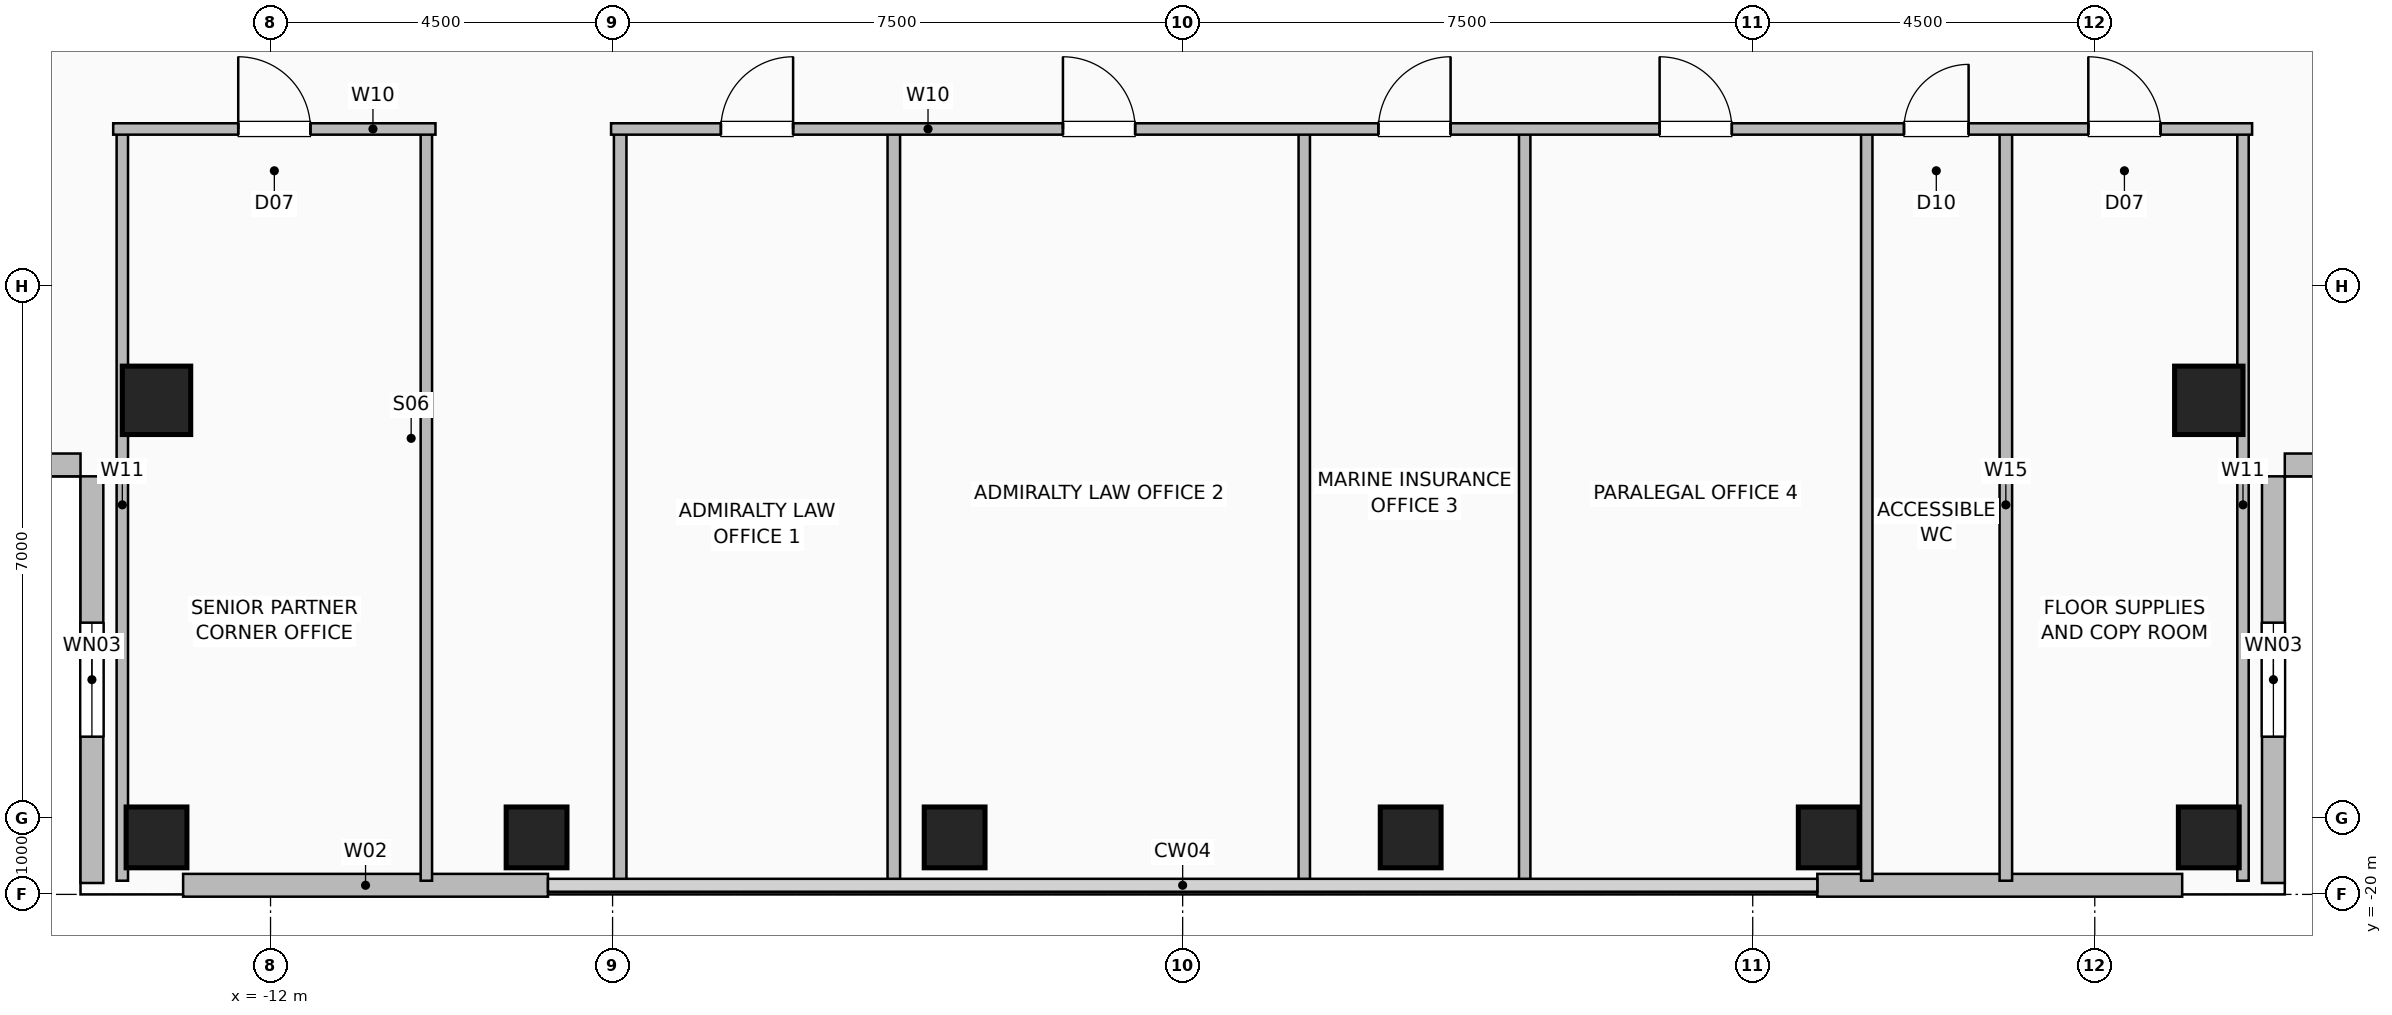
"""IFC4 building model, lengths in metres.
Left out: names, types, materials, properties, quantities, classifications, styles, units other than length and angle.
Written with IfcOpenShell. Run it as: python <this file> out.ifc"""

import sys

from ifc_helpers import new_model, si_unit, direction, frame, frame_2d, origin, origin_2d, place, context, subcontext, project, spatial, rectangle, hollow_rectangle, extrude, element, fill, save


model = new_model("IFC4")
c1 = context("Model", 3, precision=1e-05, world=origin(), true_north=direction((0.0, 1.0)))
c2 = subcontext(c1, "Body", "Model", "MODEL_VIEW")
j1 = project(units=[si_unit("LENGTHUNIT", "METRE"), si_unit("PLANEANGLEUNIT", "RADIAN")], contexts=[c1])
p1 = place(None, origin())
s1 = spatial("IfcSite", under=j1, at=p1, CompositionType="ELEMENT")
p2 = place(p1, origin())
s2 = spatial("IfcBuilding", under=s1, at=p2, CompositionType="ELEMENT")
p3 = place(p2, frame((0.0, 0.0, 169.8)))
s3 = spatial("IfcBuildingStorey", under=s2, at=p3, CompositionType="ELEMENT", Elevation=169.8)
for number, where, z_axis, x_axis in (
    (1, (-13.5, -19.25, 0.0), (0.0, 0.0, 1.0), (1.0, 0.0, 0.0)),
    (2, (-8.5, -19.25, 0.0), (0.0, 0.0, 1.0), (1.0, 0.0, 0.0)),
    (3, (-3.0, -19.25, 0.0), (0.0, 0.0, 1.0), (1.0, 0.0, 0.0)),
    (4, (3.0, -19.25, 0.0), (0.0, 0.0, 1.0), (1.0, 0.0, 0.0)),
    (5, (8.5, -19.25, 0.0), (0.0, 0.0, 1.0), (1.0, 0.0, 0.0)),
    (6, (13.5, -19.25, 0.0), (0.0, 0.0, 1.0), (1.0, 0.0, 0.0)),
):
    element("IfcColumn", number, at=place(p3, frame(where, z_axis=z_axis, x_axis=x_axis)), inside=s3, PredefinedType="COLUMN", context=c2, shape_type="SweptSolid", body=[
        extrude(hollow_rectangle(XDim=0.8, YDim=0.8, WallThickness=0.04, at=origin_2d()), origin(), (0.0, 0.0, 1.0), 3.6),
    ])
for number, where, z_axis, x_axis in (
    (7, (-13.5, -13.5, 0.0), (0.0, 0.0, 1.0), (1.0, 0.0, 0.0)),
    (8, (13.5, -13.5, 0.0), (0.0, 0.0, 1.0), (1.0, 0.0, 0.0)),
):
    element("IfcColumn", number, at=place(p3, frame(where, z_axis=z_axis, x_axis=x_axis)), inside=s3, PredefinedType="COLUMN", context=c2, shape_type="SweptSolid", body=[
        extrude(hollow_rectangle(XDim=0.9, YDim=0.9, WallThickness=0.045, at=origin_2d()), origin(), (0.0, 0.0, 1.0), 3.6),
    ])
for number, where, z_axis, x_axis in (
    (9, (-13.15, -19.88, 0.0), (0.0, 0.0, 1.0), (1.0, 0.0, 0.0)),
    (10, (8.35, -19.88, 0.0), (0.0, 0.0, 1.0), (1.0, 0.0, 0.0)),
):
    element("IfcWall", number, at=place(p3, frame(where, z_axis=z_axis, x_axis=x_axis)), inside=s3, PredefinedType="SOLIDWALL", context=c2, shape_type="SweptSolid", body=[
        extrude(rectangle(XDim=4.8, YDim=0.3, at=frame_2d((2.4, 0.0))), origin(), (0.0, 0.0, 1.0), 3.36),
    ])
p4 = place(p3, frame((-14.35, -19.85, 0.0), z_axis=(0.0, 0.0, 1.0), x_axis=(0.0, 1.0, 0.0)))
e11 = element("IfcWall", 11, at=p4, inside=s3, PredefinedType="SOLIDWALL", context=c2, shape_type="SweptSolid", body=[
    extrude(rectangle(XDim=5.35, YDim=0.3, at=frame_2d((2.675, 0.0))), origin(), (0.0, 0.0, 1.0), 3.36),
])
p5 = place(p4, frame((1.925, 0.0, 0.9)))
e12 = element("IfcOpeningElement", 12, at=p5, cuts=e11, PredefinedType="OPENING", context=c2, shape_type="SweptSolid", body=[
    extrude(rectangle(XDim=1.5, YDim=1.8, at=frame_2d((0.75, 0.9))), frame((0.0, 0.16, 0.0), z_axis=(0.0, -1.0, 0.0), x_axis=(1.0, 0.0, 0.0)), (0.0, 0.0, 1.0), 0.32),
])
p6 = place(p3, frame((-19.85, -14.35, 0.0), z_axis=(0.0, 0.0, 1.0), x_axis=(1.0, 0.0, 0.0)))
e13 = element("IfcWall", 13, at=p6, inside=s3, PredefinedType="SOLIDWALL", context=c2, shape_type="SweptSolid", body=[
    extrude(rectangle(XDim=5.35, YDim=0.3, at=frame_2d((2.675, 0.0))), origin(), (0.0, 0.0, 1.0), 3.36),
])
p7 = place(p3, frame((14.35, -19.85, 0.0), z_axis=(0.0, 0.0, 1.0), x_axis=(0.0, 1.0, 0.0)))
e14 = element("IfcWall", 14, at=p7, inside=s3, PredefinedType="SOLIDWALL", context=c2, shape_type="SweptSolid", body=[
    extrude(rectangle(XDim=5.35, YDim=0.3, at=frame_2d((2.675, 0.0))), origin(), (0.0, 0.0, 1.0), 3.36),
])
p8 = place(p7, frame((1.925, 0.0, 0.9)))
e15 = element("IfcOpeningElement", 15, at=p8, cuts=e14, PredefinedType="OPENING", context=c2, shape_type="SweptSolid", body=[
    extrude(rectangle(XDim=1.5, YDim=1.8, at=frame_2d((0.75, 0.9))), frame((0.0, 0.16, 0.0), z_axis=(0.0, -1.0, 0.0), x_axis=(1.0, 0.0, 0.0)), (0.0, 0.0, 1.0), 0.32),
])
p9 = place(p3, frame((19.85, -14.35, 0.0), z_axis=(0.0, 0.0, 1.0), x_axis=(-1.0, 0.0, 0.0)))
e16 = element("IfcWall", 16, at=p9, inside=s3, PredefinedType="SOLIDWALL", context=c2, shape_type="SweptSolid", body=[
    extrude(rectangle(XDim=5.35, YDim=0.3, at=frame_2d((2.675, 0.0))), origin(), (0.0, 0.0, 1.0), 3.36),
])
for number, where, z_axis, x_axis in (
    (17, (-13.95, -19.82, 0.0), (0.0, 0.0, 1.0), (0.0, 1.0, 0.0)),
    (18, (-9.95, -19.82, 0.0), (0.0, 0.0, 1.0), (0.0, 1.0, 0.0)),
):
    element("IfcWall", number, at=place(p3, frame(where, z_axis=z_axis, x_axis=x_axis)), inside=s3, PredefinedType="PARTITIONING", context=c2, shape_type="SweptSolid", body=[
        extrude(rectangle(XDim=9.89, YDim=0.15, at=frame_2d((4.945, 0.0))), origin(), (0.0, 0.0, 1.0), 3.36),
    ])
p10 = place(p3, frame((-14.07, -9.93, 0.0), z_axis=(0.0, 0.0, 1.0), x_axis=(1.0, 0.0, 0.0)))
e19 = element("IfcWall", 19, at=p10, inside=s3, PredefinedType="PARTITIONING", context=c2, shape_type="SweptSolid", body=[
    extrude(rectangle(XDim=4.24, YDim=0.15, at=frame_2d((2.12, 0.0))), origin(), (0.0, 0.0, 1.0), 3.36),
])
p11 = place(p10, frame((1.645, 0.0, 0.0)))
e20 = element("IfcOpeningElement", 20, at=p11, cuts=e19, PredefinedType="OPENING", context=c2, shape_type="SweptSolid", body=[
    extrude(rectangle(XDim=0.95, YDim=2.06, at=frame_2d((0.475, 1.03))), frame((0.0, 0.085, 0.0), z_axis=(0.0, -1.0, 0.0), x_axis=(1.0, 0.0, 0.0)), (0.0, 0.0, 1.0), 0.17),
])
for number, where, z_axis, x_axis in (
    (21, (10.83, -19.82, 0.0), (0.0, 0.0, 1.0), (0.0, 1.0, 0.0)),
    (22, (-7.4, -19.82, 0.0), (0.0, 0.0, 1.0), (0.0, 1.0, 0.0)),
    (23, (-3.8, -19.82, 0.0), (0.0, 0.0, 1.0), (0.0, 1.0, 0.0)),
):
    element("IfcWall", number, at=place(p3, frame(where, z_axis=z_axis, x_axis=x_axis)), inside=s3, PredefinedType="PLUMBINGWALL", context=c2, shape_type="SweptSolid", body=[
        extrude(rectangle(XDim=9.89, YDim=0.165, at=frame_2d((4.945, 0.0))), origin(), (0.0, 0.0, 1.0), 3.36),
    ])
for number, where, z_axis, x_axis in (
    (24, (1.6, -19.82, 0.0), (0.0, 0.0, 1.0), (0.0, 1.0, 0.0)),
    (25, (4.5, -19.82, 0.0), (0.0, 0.0, 1.0), (0.0, 1.0, 0.0)),
    (26, (9.0, -19.82, 0.0), (0.0, 0.0, 1.0), (0.0, 1.0, 0.0)),
    (27, (13.95, -19.82, 0.0), (0.0, 0.0, 1.0), (0.0, 1.0, 0.0)),
):
    element("IfcWall", number, at=place(p3, frame(where, z_axis=z_axis, x_axis=x_axis)), inside=s3, PredefinedType="PARTITIONING", context=c2, shape_type="SweptSolid", body=[
        extrude(rectangle(XDim=9.89, YDim=0.15, at=frame_2d((4.945, 0.0))), origin(), (0.0, 0.0, 1.0), 3.36),
    ])
p12 = place(p3, frame((-7.52, -9.93, 0.0), z_axis=(0.0, 0.0, 1.0), x_axis=(1.0, 0.0, 0.0)))
e28 = element("IfcWall", 28, at=p12, inside=s3, PredefinedType="PARTITIONING", context=c2, shape_type="SweptSolid", body=[
    extrude(rectangle(XDim=21.59, YDim=0.15, at=frame_2d((10.795, 0.0))), origin(), (0.0, 0.0, 1.0), 3.36),
])
p13 = place(p12, frame((1.445, 0.0, 0.0)))
e29 = element("IfcOpeningElement", 29, at=p13, cuts=e28, PredefinedType="OPENING", context=c2, shape_type="SweptSolid", body=[
    extrude(rectangle(XDim=0.95, YDim=2.06, at=frame_2d((0.475, 1.03))), frame((0.0, 0.085, 0.0), z_axis=(0.0, -1.0, 0.0), x_axis=(1.0, 0.0, 0.0)), (0.0, 0.0, 1.0), 0.17),
])
p14 = place(p12, frame((5.945, 0.0, 0.0)))
e30 = element("IfcOpeningElement", 30, at=p14, cuts=e28, PredefinedType="OPENING", context=c2, shape_type="SweptSolid", body=[
    extrude(rectangle(XDim=0.95, YDim=2.06, at=frame_2d((0.475, 1.03))), frame((0.0, 0.085, 0.0), z_axis=(0.0, -1.0, 0.0), x_axis=(1.0, 0.0, 0.0)), (0.0, 0.0, 1.0), 0.17),
])
p15 = place(p12, frame((10.095, 0.0, 0.0)))
e31 = element("IfcOpeningElement", 31, at=p15, cuts=e28, PredefinedType="OPENING", context=c2, shape_type="SweptSolid", body=[
    extrude(rectangle(XDim=0.95, YDim=2.06, at=frame_2d((0.475, 1.03))), frame((0.0, 0.085, 0.0), z_axis=(0.0, -1.0, 0.0), x_axis=(1.0, 0.0, 0.0)), (0.0, 0.0, 1.0), 0.17),
])
p16 = place(p12, frame((13.795, 0.0, 0.0)))
e32 = element("IfcOpeningElement", 32, at=p16, cuts=e28, PredefinedType="OPENING", context=c2, shape_type="SweptSolid", body=[
    extrude(rectangle(XDim=0.95, YDim=2.06, at=frame_2d((0.475, 1.03))), frame((0.0, 0.085, 0.0), z_axis=(0.0, -1.0, 0.0), x_axis=(1.0, 0.0, 0.0)), (0.0, 0.0, 1.0), 0.17),
])
p17 = place(p12, frame((17.01, 0.0, 0.0)))
e33 = element("IfcOpeningElement", 33, at=p17, cuts=e28, PredefinedType="OPENING", context=c2, shape_type="SweptSolid", body=[
    extrude(rectangle(XDim=0.85, YDim=2.05, at=frame_2d((0.425, 1.025))), frame((0.0, 0.085, 0.0), z_axis=(0.0, -1.0, 0.0), x_axis=(1.0, 0.0, 0.0)), (0.0, 0.0, 1.0), 0.17),
])
p18 = place(p12, frame((19.435, 0.0, 0.0)))
e34 = element("IfcOpeningElement", 34, at=p18, cuts=e28, PredefinedType="OPENING", context=c2, shape_type="SweptSolid", body=[
    extrude(rectangle(XDim=0.95, YDim=2.06, at=frame_2d((0.475, 1.03))), frame((0.0, 0.085, 0.0), z_axis=(0.0, -1.0, 0.0), x_axis=(1.0, 0.0, 0.0)), (0.0, 0.0, 1.0), 0.17),
])
p19 = place(p5, origin())
e35 = element("IfcWindow", 35, at=p19, inside=s3, PartitioningType="SINGLE_PANEL", PredefinedType="WINDOW", context=c2, shape_type="SweptSolid", body=[
    extrude(rectangle(XDim=1.5, YDim=1.8, at=frame_2d((0.75, 0.9))), frame((0.0, 0.03, 0.0), z_axis=(0.0, -1.0, 0.0), x_axis=(1.0, 0.0, 0.0)), (0.0, 0.0, 1.0), 0.06),
])
fill(e12, e35)
p20 = place(p8, origin())
e36 = element("IfcWindow", 36, at=p20, inside=s3, PartitioningType="SINGLE_PANEL", PredefinedType="WINDOW", context=c2, shape_type="SweptSolid", body=[
    extrude(rectangle(XDim=1.5, YDim=1.8, at=frame_2d((0.75, 0.9))), frame((0.0, 0.03, 0.0), z_axis=(0.0, -1.0, 0.0), x_axis=(1.0, 0.0, 0.0)), (0.0, 0.0, 1.0), 0.06),
])
fill(e15, e36)
p21 = place(p11, origin())
e37 = element("IfcDoor", 37, at=p21, inside=s3, OperationType="SINGLE_SWING_LEFT", PredefinedType="DOOR", context=c2, shape_type="SweptSolid", body=[
    extrude(rectangle(XDim=0.95, YDim=2.06, at=frame_2d((0.475, 1.03))), frame((0.0, 0.025, 0.0), z_axis=(0.0, -1.0, 0.0), x_axis=(1.0, 0.0, 0.0)), (0.0, 0.0, 1.0), 0.05),
])
fill(e20, e37)
p22 = place(p13, origin())
e38 = element("IfcDoor", 38, at=p22, inside=s3, OperationType="SINGLE_SWING_RIGHT", PredefinedType="DOOR", context=c2, shape_type="SweptSolid", body=[
    extrude(rectangle(XDim=0.95, YDim=2.06, at=frame_2d((0.475, 1.03))), frame((0.0, 0.025, 0.0), z_axis=(0.0, -1.0, 0.0), x_axis=(1.0, 0.0, 0.0)), (0.0, 0.0, 1.0), 0.05),
])
fill(e29, e38)
p23 = place(p14, origin())
e39 = element("IfcDoor", 39, at=p23, inside=s3, OperationType="SINGLE_SWING_LEFT", PredefinedType="DOOR", context=c2, shape_type="SweptSolid", body=[
    extrude(rectangle(XDim=0.95, YDim=2.06, at=frame_2d((0.475, 1.03))), frame((0.0, 0.025, 0.0), z_axis=(0.0, -1.0, 0.0), x_axis=(1.0, 0.0, 0.0)), (0.0, 0.0, 1.0), 0.05),
])
fill(e30, e39)
p24 = place(p15, origin())
e40 = element("IfcDoor", 40, at=p24, inside=s3, OperationType="SINGLE_SWING_RIGHT", PredefinedType="DOOR", context=c2, shape_type="SweptSolid", body=[
    extrude(rectangle(XDim=0.95, YDim=2.06, at=frame_2d((0.475, 1.03))), frame((0.0, 0.025, 0.0), z_axis=(0.0, -1.0, 0.0), x_axis=(1.0, 0.0, 0.0)), (0.0, 0.0, 1.0), 0.05),
])
fill(e31, e40)
p25 = place(p16, origin())
e41 = element("IfcDoor", 41, at=p25, inside=s3, OperationType="SINGLE_SWING_LEFT", PredefinedType="DOOR", context=c2, shape_type="SweptSolid", body=[
    extrude(rectangle(XDim=0.95, YDim=2.06, at=frame_2d((0.475, 1.03))), frame((0.0, 0.025, 0.0), z_axis=(0.0, -1.0, 0.0), x_axis=(1.0, 0.0, 0.0)), (0.0, 0.0, 1.0), 0.05),
])
fill(e32, e41)
p26 = place(p17, origin())
e42 = element("IfcDoor", 42, at=p26, inside=s3, OperationType="SINGLE_SWING_RIGHT", PredefinedType="DOOR", context=c2, shape_type="SweptSolid", body=[
    extrude(rectangle(XDim=0.85, YDim=2.05, at=frame_2d((0.425, 1.025))), frame((0.0, 0.025, 0.0), z_axis=(0.0, -1.0, 0.0), x_axis=(1.0, 0.0, 0.0)), (0.0, 0.0, 1.0), 0.05),
])
fill(e33, e42)
p27 = place(p18, origin())
e43 = element("IfcDoor", 43, at=p27, inside=s3, OperationType="SINGLE_SWING_LEFT", PredefinedType="DOOR", context=c2, shape_type="SweptSolid", body=[
    extrude(rectangle(XDim=0.95, YDim=2.06, at=frame_2d((0.475, 1.03))), frame((0.0, 0.025, 0.0), z_axis=(0.0, -1.0, 0.0), x_axis=(1.0, 0.0, 0.0)), (0.0, 0.0, 1.0), 0.05),
])
fill(e34, e43)
save(model, sys.argv[1])
